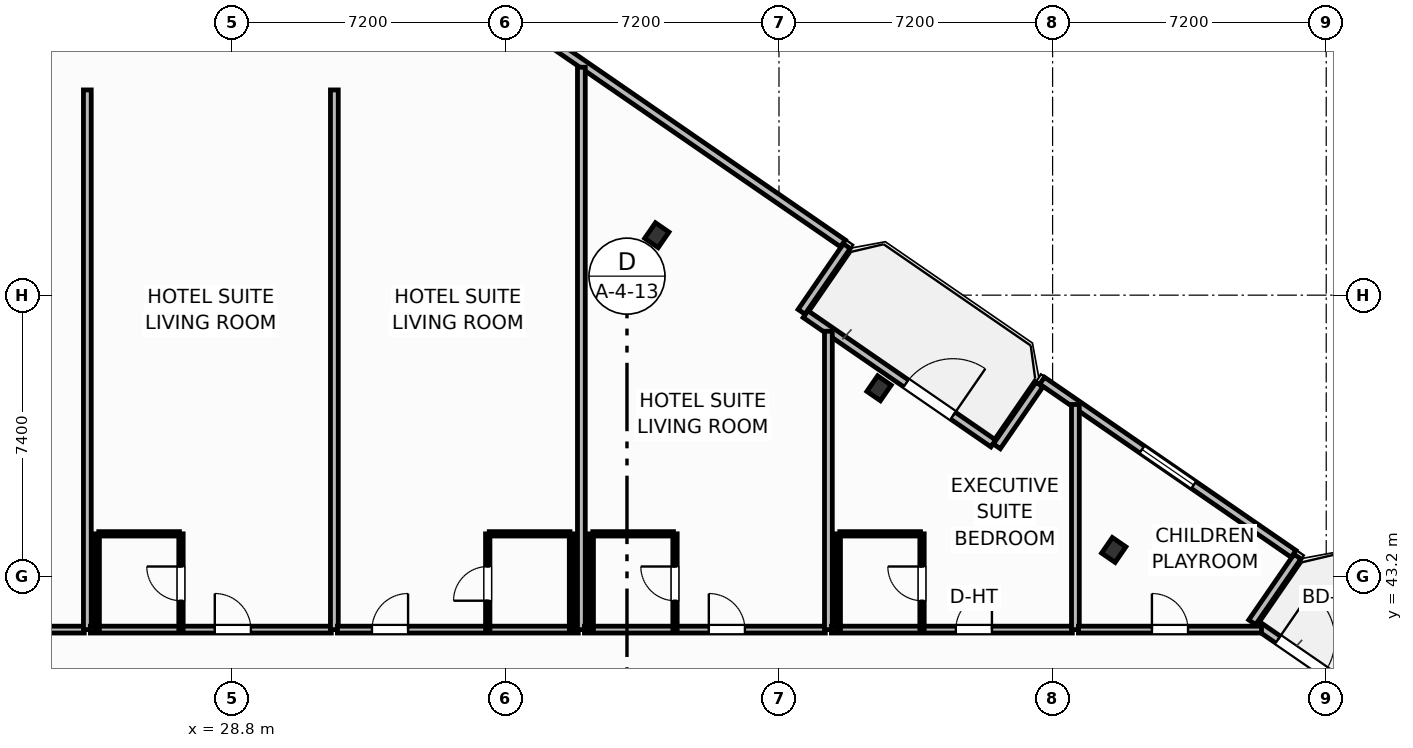
"""IFC4 building model, lengths in metres.
Left out: names, types, materials, properties, quantities, classifications, styles, units other than length and angle.
Written with IfcOpenShell. Run it as: python <this file> out.ifc"""

import sys

from ifc_helpers import new_model, si_unit, direction, frame, frame_2d, origin, origin_2d, place, context, subcontext, project, spatial, rectangle, i_section, extrude, element, fill, save


model = new_model("IFC4")
c1 = context("Model", 3, precision=1e-05, world=origin(), true_north=direction((0.0, 1.0)))
c2 = subcontext(c1, "Body", "Model", "MODEL_VIEW")
j1 = project(units=[si_unit("LENGTHUNIT", "METRE"), si_unit("PLANEANGLEUNIT", "RADIAN")], contexts=[c1])
p1 = place(None, origin())
s1 = spatial("IfcSite", under=j1, at=p1, CompositionType="ELEMENT")
p2 = place(p1, origin())
s2 = spatial("IfcBuilding", under=s1, at=p2, CompositionType="ELEMENT")
p3 = place(p2, frame((0.0, 0.0, 64.0)))
s3 = spatial("IfcBuildingStorey", under=s2, at=p3, CompositionType="ELEMENT", Elevation=64.0)
for number, where, z_axis, x_axis in (
    (1, (52.009, 43.896, 0.0), (0.0, 0.0, 1.0), (0.824, -0.567, 0.0)),
    (2, (45.833, 48.15, 0.0), (0.0, 0.0, 1.0), (0.824, -0.567, 0.0)),
    (3, (39.985, 52.177, 0.0), (0.0, 0.0, 1.0), (0.824, -0.567, 0.0)),
):
    element("IfcColumn", number, at=place(p3, frame(where, z_axis=z_axis, x_axis=x_axis)), inside=s3, PredefinedType="COLUMN", context=c2, shape_type="SweptSolid", body=[
        extrude(i_section(OverallWidth=0.432, OverallDepth=0.498, WebThickness=0.056, FlangeThickness=0.089, FilletRadius=0.025, at=origin_2d()), origin(), (0.0, 0.0, 1.0), 3.7),
    ])
p4 = place(p3, frame((43.898, 50.102, 0.0), z_axis=(0.0, 0.0, 1.0), x_axis=(0.823534636215, -0.567265989598, 0.0)))
e4 = element("IfcWall", 4, at=p4, inside=s3, PredefinedType="SOLIDWALL", context=c2, shape_type="SweptSolid", body=[
    extrude(rectangle(XDim=6.0, YDim=0.22, at=frame_2d((3.0, 0.0))), origin(), (0.0, 0.0, 1.0), 2.73),
])
p5 = place(p4, frame((3.212, 0.0, 0.0)))
e5 = element("IfcOpeningElement", 5, at=p5, cuts=e4, PredefinedType="OPENING", context=c2, shape_type="SweptSolid", body=[
    extrude(rectangle(XDim=1.5, YDim=2.25, at=frame_2d((0.75, 1.125))), frame((0.0, 0.12, 0.0), z_axis=(0.0, -1.0, 0.0), x_axis=(1.0, 0.0, 0.0)), (0.0, 0.0, 1.0), 0.24),
])
p6 = place(p3, frame((55.757, 41.933, 0.0), z_axis=(0.0, 0.0, 1.0), x_axis=(0.823534636215, -0.567265989598, 0.0)))
e6 = element("IfcWall", 6, at=p6, inside=s3, PredefinedType="SOLIDWALL", context=c2, shape_type="SweptSolid", body=[
    extrude(rectangle(XDim=6.0, YDim=0.22, at=frame_2d((3.0, 0.0))), origin(), (0.0, 0.0, 1.0), 2.73),
])
p7 = place(p6, frame((0.696, 0.0, 0.0)))
e7 = element("IfcOpeningElement", 7, at=p7, cuts=e6, PredefinedType="OPENING", context=c2, shape_type="SweptSolid", body=[
    extrude(rectangle(XDim=1.5, YDim=2.25, at=frame_2d((0.75, 1.125))), frame((0.0, 0.12, 0.0), z_axis=(0.0, -1.0, 0.0), x_axis=(1.0, 0.0, 0.0)), (0.0, 0.0, 1.0), 0.24),
])
p8 = place(p3, frame((55.653, 41.993, 0.0), z_axis=(0.0, 0.0, 1.0), x_axis=(0.567273696173, 0.823529327729, 0.0)))
e8 = element("IfcWall", 8, at=p8, inside=s3, PredefinedType="SOLIDWALL", context=c2, shape_type="SweptSolid", body=[
    extrude(rectangle(XDim=2.1, YDim=0.22, at=frame_2d((1.05, 0.0))), origin(), (0.0, 0.0, 1.0), 2.73),
])
p9 = place(p3, frame((56.741, 43.793, 0.0), z_axis=(0.0, 0.0, 1.0), x_axis=(-0.823530942962, 0.56727135128, 0.0)))
e9 = element("IfcWall", 9, at=p9, inside=s3, PredefinedType="SOLIDWALL", context=c2, shape_type="SweptSolid", body=[
    extrude(rectangle(XDim=8.035, YDim=0.22, at=frame_2d((4.018, 0.0))), origin(), (0.0, 0.0, 1.0), 2.73),
])
p10 = place(p9, frame((3.192, 0.0, 0.8)))
e10 = element("IfcOpeningElement", 10, at=p10, cuts=e9, PredefinedType="OPENING", context=c2, shape_type="SweptSolid", body=[
    extrude(rectangle(XDim=1.65, YDim=1.65, at=frame_2d((0.825, 0.825))), frame((0.0, 0.12, 0.0), z_axis=(0.0, -1.0, 0.0), x_axis=(1.0, 0.0, 0.0)), (0.0, 0.0, 1.0), 0.24),
])
p11 = place(p3, frame((50.053, 48.248, 0.0), z_axis=(0.0, 0.0, 1.0), x_axis=(-0.567273565974, -0.823529417415, 0.0)))
e11 = element("IfcWall", 11, at=p11, inside=s3, PredefinedType="SOLIDWALL", context=c2, shape_type="SweptSolid", body=[
    extrude(rectangle(XDim=1.975, YDim=0.22, at=frame_2d((0.988, 0.0))), origin(), (0.0, 0.0, 1.0), 2.73),
])
p12 = place(p3, frame((43.794, 50.161, 0.0), z_axis=(0.0, 0.0, 1.0), x_axis=(0.567352541689, 0.823475010816, 0.0)))
e12 = element("IfcWall", 12, at=p12, inside=s3, PredefinedType="SOLIDWALL", context=c2, shape_type="SweptSolid", body=[
    extrude(rectangle(XDim=2.1, YDim=0.22, at=frame_2d((1.05, 0.0))), origin(), (0.0, 0.0, 1.0), 2.73),
])
p13 = place(p3, frame((44.882, 51.962, 0.0), z_axis=(0.0, 0.0, 1.0), x_axis=(-0.823534427573, 0.567266292497, 0.0)))
e13 = element("IfcWall", 13, at=p13, inside=s3, PredefinedType="SOLIDWALL", context=c2, shape_type="SweptSolid", body=[
    extrude(rectangle(XDim=23.147, YDim=0.22, at=frame_2d((11.574, 0.0))), origin(), (0.0, 0.0, 1.0), 2.73),
])
p14 = place(p13, frame((10.749, 0.0, 0.8)))
e14 = element("IfcOpeningElement", 14, at=p14, cuts=e13, PredefinedType="OPENING", context=c2, shape_type="SweptSolid", body=[
    extrude(rectangle(XDim=1.65, YDim=1.65, at=frame_2d((0.825, 0.825))), frame((0.0, 0.12, 0.0), z_axis=(0.0, -1.0, 0.0), x_axis=(1.0, 0.0, 0.0)), (0.0, 0.0, 1.0), 0.24),
])
p15 = place(p3, frame((3.176, 41.8, 0.0), z_axis=(0.0, 0.0, 1.0), x_axis=(1.0, 0.0, 0.0)))
e15 = element("IfcWall", 15, at=p15, inside=s3, PredefinedType="PARTITIONING", context=c2, shape_type="SweptSolid", body=[
    extrude(rectangle(XDim=21.744, YDim=0.18, at=frame_2d((10.872, 0.0))), origin(), (0.0, 0.0, 1.0), 3.45),
])
p16 = place(p15, frame((18.101, 0.0, 0.0)))
e16 = element("IfcOpeningElement", 16, at=p16, cuts=e15, PredefinedType="OPENING", context=c2, shape_type="SweptSolid", body=[
    extrude(rectangle(XDim=0.95, YDim=2.15, at=frame_2d((0.475, 1.075))), frame((0.0, 0.1, 0.0), z_axis=(0.0, -1.0, 0.0), x_axis=(1.0, 0.0, 0.0)), (0.0, 0.0, 1.0), 0.2),
])
p17 = place(p3, frame((25.0, 41.8, 0.0), z_axis=(0.0, 0.0, 1.0), x_axis=(0.0, 1.0, 0.0)))
e17 = element("IfcWall", 17, at=p17, inside=s3, PredefinedType="PARTITIONING", context=c2, shape_type="SweptSolid", body=[
    extrude(rectangle(XDim=14.2, YDim=0.205, at=frame_2d((7.1, 0.0))), origin(), (0.0, 0.0, 1.0), 3.45),
])
p18 = place(p3, frame((25.08, 41.8, 0.0), z_axis=(0.0, 0.0, 1.0), x_axis=(1.0, 0.0, 0.0)))
e18 = element("IfcWall", 18, at=p18, inside=s3, PredefinedType="PARTITIONING", context=c2, shape_type="SweptSolid", body=[
    extrude(rectangle(XDim=6.34, YDim=0.18, at=frame_2d((3.17, 0.0))), origin(), (0.0, 0.0, 1.0), 3.45),
])
p19 = place(p18, frame((3.274, 0.0, 0.0)))
e19 = element("IfcOpeningElement", 19, at=p19, cuts=e18, PredefinedType="OPENING", context=c2, shape_type="SweptSolid", body=[
    extrude(rectangle(XDim=0.95, YDim=2.15, at=frame_2d((0.475, 1.075))), frame((0.0, 0.1, 0.0), z_axis=(0.0, -1.0, 0.0), x_axis=(1.0, 0.0, 0.0)), (0.0, 0.0, 1.0), 0.2),
])
p20 = place(p3, frame((25.3, 44.32, 0.0), z_axis=(0.0, 0.0, 1.0), x_axis=(1.0, 0.0, 0.0)))
e20 = element("IfcWall", 20, at=p20, inside=s3, PredefinedType="PARTITIONING", context=c2, shape_type="SweptSolid", body=[
    extrude(rectangle(XDim=2.124, YDim=0.115, at=frame_2d((1.062, 0.0))), origin(), (0.0, 0.0, 1.0), 3.45),
])
p21 = place(p3, frame((27.464, 41.8, 0.0), z_axis=(0.0, 0.0, 1.0), x_axis=(0.0, 1.0, 0.0)))
e21 = element("IfcWall", 21, at=p21, inside=s3, PredefinedType="PARTITIONING", context=c2, shape_type="SweptSolid", body=[
    extrude(rectangle(XDim=2.52, YDim=0.115, at=frame_2d((1.26, 0.0))), origin(), (0.0, 0.0, 1.0), 3.45),
])
p22 = place(p21, frame((0.76, 0.0, 0.0)))
e22 = element("IfcOpeningElement", 22, at=p22, cuts=e21, PredefinedType="OPENING", context=c2, shape_type="SweptSolid", body=[
    extrude(rectangle(XDim=0.9, YDim=2.05, at=frame_2d((0.45, 1.025))), frame((0.0, 0.067, 0.0), z_axis=(0.0, -1.0, 0.0), x_axis=(1.0, 0.0, 0.0)), (0.0, 0.0, 1.0), 0.135),
])
p23 = place(p3, frame((25.26, 41.8, 0.0), z_axis=(0.0, 0.0, 1.0), x_axis=(0.0, 1.0, 0.0)))
e23 = element("IfcWall", 23, at=p23, inside=s3, PredefinedType="PARTITIONING", context=c2, shape_type="SweptSolid", body=[
    extrude(rectangle(XDim=2.52, YDim=0.115, at=frame_2d((1.26, 0.0))), origin(), (0.0, 0.0, 1.0), 3.45),
])
p24 = place(p3, frame((31.5, 41.8, 0.0), z_axis=(0.0, 0.0, 1.0), x_axis=(0.0, 1.0, 0.0)))
e24 = element("IfcWall", 24, at=p24, inside=s3, PredefinedType="PARTITIONING", context=c2, shape_type="SweptSolid", body=[
    extrude(rectangle(XDim=14.2, YDim=0.205, at=frame_2d((7.1, 0.0))), origin(), (0.0, 0.0, 1.0), 3.45),
])
p25 = place(p3, frame((31.58, 41.8, 0.0), z_axis=(0.0, 0.0, 1.0), x_axis=(1.0, 0.0, 0.0)))
e25 = element("IfcWall", 25, at=p25, inside=s3, PredefinedType="PARTITIONING", context=c2, shape_type="SweptSolid", body=[
    extrude(rectangle(XDim=6.34, YDim=0.18, at=frame_2d((3.17, 0.0))), origin(), (0.0, 0.0, 1.0), 3.45),
])
p26 = place(p25, frame((0.91, 0.0, 0.0)))
e26 = element("IfcOpeningElement", 26, at=p26, cuts=e25, PredefinedType="OPENING", context=c2, shape_type="SweptSolid", body=[
    extrude(rectangle(XDim=0.95, YDim=2.15, at=frame_2d((0.475, 1.075))), frame((0.0, 0.1, 0.0), z_axis=(0.0, -1.0, 0.0), x_axis=(1.0, 0.0, 0.0)), (0.0, 0.0, 1.0), 0.2),
])
p27 = place(p3, frame((35.576, 44.32, 0.0), z_axis=(0.0, 0.0, 1.0), x_axis=(1.0, 0.0, 0.0)))
e27 = element("IfcWall", 27, at=p27, inside=s3, PredefinedType="PARTITIONING", context=c2, shape_type="SweptSolid", body=[
    extrude(rectangle(XDim=2.124, YDim=0.115, at=frame_2d((1.062, 0.0))), origin(), (0.0, 0.0, 1.0), 3.45),
])
p28 = place(p3, frame((35.536, 41.8, 0.0), z_axis=(0.0, 0.0, 1.0), x_axis=(0.0, 1.0, 0.0)))
e28 = element("IfcWall", 28, at=p28, inside=s3, PredefinedType="PARTITIONING", context=c2, shape_type="SweptSolid", body=[
    extrude(rectangle(XDim=2.52, YDim=0.115, at=frame_2d((1.26, 0.0))), origin(), (0.0, 0.0, 1.0), 3.45),
])
p29 = place(p28, frame((0.76, 0.0, 0.0)))
e29 = element("IfcOpeningElement", 29, at=p29, cuts=e28, PredefinedType="OPENING", context=c2, shape_type="SweptSolid", body=[
    extrude(rectangle(XDim=0.9, YDim=2.05, at=frame_2d((0.45, 1.025))), frame((0.0, 0.067, 0.0), z_axis=(0.0, -1.0, 0.0), x_axis=(1.0, 0.0, 0.0)), (0.0, 0.0, 1.0), 0.135),
])
p30 = place(p3, frame((37.74, 41.8, 0.0), z_axis=(0.0, 0.0, 1.0), x_axis=(0.0, 1.0, 0.0)))
e30 = element("IfcWall", 30, at=p30, inside=s3, PredefinedType="PARTITIONING", context=c2, shape_type="SweptSolid", body=[
    extrude(rectangle(XDim=2.52, YDim=0.115, at=frame_2d((1.26, 0.0))), origin(), (0.0, 0.0, 1.0), 3.45),
])
p31 = place(p3, frame((38.0, 41.8, 0.0), z_axis=(0.0, 0.0, 1.0), x_axis=(0.0, 1.0, 0.0)))
e31 = element("IfcWall", 31, at=p31, inside=s3, PredefinedType="PARTITIONING", context=c2, shape_type="SweptSolid", body=[
    extrude(rectangle(XDim=14.797, YDim=0.205, at=frame_2d((7.398, 0.0))), origin(), (0.0, 0.0, 1.0), 3.45),
])
p32 = place(p3, frame((38.08, 41.8, 0.0), z_axis=(0.0, 0.0, 1.0), x_axis=(1.0, 0.0, 0.0)))
e32 = element("IfcWall", 32, at=p32, inside=s3, PredefinedType="PARTITIONING", context=c2, shape_type="SweptSolid", body=[
    extrude(rectangle(XDim=6.34, YDim=0.18, at=frame_2d((3.17, 0.0))), origin(), (0.0, 0.0, 1.0), 3.45),
])
p33 = place(p32, frame((3.274, 0.0, 0.0)))
e33 = element("IfcOpeningElement", 33, at=p33, cuts=e32, PredefinedType="OPENING", context=c2, shape_type="SweptSolid", body=[
    extrude(rectangle(XDim=0.95, YDim=2.15, at=frame_2d((0.475, 1.075))), frame((0.0, 0.1, 0.0), z_axis=(0.0, -1.0, 0.0), x_axis=(1.0, 0.0, 0.0)), (0.0, 0.0, 1.0), 0.2),
])
p34 = place(p3, frame((38.3, 44.32, 0.0), z_axis=(0.0, 0.0, 1.0), x_axis=(1.0, 0.0, 0.0)))
e34 = element("IfcWall", 34, at=p34, inside=s3, PredefinedType="PARTITIONING", context=c2, shape_type="SweptSolid", body=[
    extrude(rectangle(XDim=2.124, YDim=0.115, at=frame_2d((1.062, 0.0))), origin(), (0.0, 0.0, 1.0), 3.45),
])
p35 = place(p3, frame((40.464, 41.8, 0.0), z_axis=(0.0, 0.0, 1.0), x_axis=(0.0, 1.0, 0.0)))
e35 = element("IfcWall", 35, at=p35, inside=s3, PredefinedType="PARTITIONING", context=c2, shape_type="SweptSolid", body=[
    extrude(rectangle(XDim=2.52, YDim=0.115, at=frame_2d((1.26, 0.0))), origin(), (0.0, 0.0, 1.0), 3.45),
])
p36 = place(p35, frame((0.76, 0.0, 0.0)))
e36 = element("IfcOpeningElement", 36, at=p36, cuts=e35, PredefinedType="OPENING", context=c2, shape_type="SweptSolid", body=[
    extrude(rectangle(XDim=0.9, YDim=2.05, at=frame_2d((0.45, 1.025))), frame((0.0, 0.067, 0.0), z_axis=(0.0, -1.0, 0.0), x_axis=(1.0, 0.0, 0.0)), (0.0, 0.0, 1.0), 0.135),
])
p37 = place(p3, frame((38.26, 41.8, 0.0), z_axis=(0.0, 0.0, 1.0), x_axis=(0.0, 1.0, 0.0)))
e37 = element("IfcWall", 37, at=p37, inside=s3, PredefinedType="PARTITIONING", context=c2, shape_type="SweptSolid", body=[
    extrude(rectangle(XDim=2.52, YDim=0.115, at=frame_2d((1.26, 0.0))), origin(), (0.0, 0.0, 1.0), 3.45),
])
p38 = place(p3, frame((44.5, 41.8, 0.0), z_axis=(0.0, 0.0, 1.0), x_axis=(0.0, 1.0, 0.0)))
e38 = element("IfcWall", 38, at=p38, inside=s3, PredefinedType="PARTITIONING", context=c2, shape_type="SweptSolid", body=[
    extrude(rectangle(XDim=7.851, YDim=0.205, at=frame_2d((3.925, 0.0))), origin(), (0.0, 0.0, 1.0), 3.45),
])
p39 = place(p3, frame((44.58, 41.8, 0.0), z_axis=(0.0, 0.0, 1.0), x_axis=(1.0, 0.0, 0.0)))
e39 = element("IfcWall", 39, at=p39, inside=s3, PredefinedType="PARTITIONING", context=c2, shape_type="SweptSolid", body=[
    extrude(rectangle(XDim=6.34, YDim=0.18, at=frame_2d((3.17, 0.0))), origin(), (0.0, 0.0, 1.0), 3.45),
])
p40 = place(p39, frame((3.274, 0.0, 0.0)))
e40 = element("IfcOpeningElement", 40, at=p40, cuts=e39, PredefinedType="OPENING", context=c2, shape_type="SweptSolid", body=[
    extrude(rectangle(XDim=0.95, YDim=2.15, at=frame_2d((0.475, 1.075))), frame((0.0, 0.1, 0.0), z_axis=(0.0, -1.0, 0.0), x_axis=(1.0, 0.0, 0.0)), (0.0, 0.0, 1.0), 0.2),
])
p41 = place(p3, frame((44.8, 44.32, 0.0), z_axis=(0.0, 0.0, 1.0), x_axis=(1.0, 0.0, 0.0)))
e41 = element("IfcWall", 41, at=p41, inside=s3, PredefinedType="PARTITIONING", context=c2, shape_type="SweptSolid", body=[
    extrude(rectangle(XDim=2.124, YDim=0.115, at=frame_2d((1.062, 0.0))), origin(), (0.0, 0.0, 1.0), 3.45),
])
p42 = place(p3, frame((46.964, 41.8, 0.0), z_axis=(0.0, 0.0, 1.0), x_axis=(0.0, 1.0, 0.0)))
e42 = element("IfcWall", 42, at=p42, inside=s3, PredefinedType="PARTITIONING", context=c2, shape_type="SweptSolid", body=[
    extrude(rectangle(XDim=2.52, YDim=0.115, at=frame_2d((1.26, 0.0))), origin(), (0.0, 0.0, 1.0), 2.58),
])
p43 = place(p42, frame((0.76, 0.0, 0.0)))
e43 = element("IfcOpeningElement", 43, at=p43, cuts=e42, PredefinedType="OPENING", context=c2, shape_type="SweptSolid", body=[
    extrude(rectangle(XDim=0.9, YDim=2.05, at=frame_2d((0.45, 1.025))), frame((0.0, 0.067, 0.0), z_axis=(0.0, -1.0, 0.0), x_axis=(1.0, 0.0, 0.0)), (0.0, 0.0, 1.0), 0.135),
])
p44 = place(p3, frame((44.76, 41.8, 0.0), z_axis=(0.0, 0.0, 1.0), x_axis=(0.0, 1.0, 0.0)))
e44 = element("IfcWall", 44, at=p44, inside=s3, PredefinedType="PARTITIONING", context=c2, shape_type="SweptSolid", body=[
    extrude(rectangle(XDim=2.52, YDim=0.115, at=frame_2d((1.26, 0.0))), origin(), (0.0, 0.0, 1.0), 3.45),
])
p45 = place(p3, frame((51.0, 41.8, 0.0), z_axis=(0.0, 0.0, 1.0), x_axis=(0.0, 1.0, 0.0)))
e45 = element("IfcWall", 45, at=p45, inside=s3, PredefinedType="PARTITIONING", context=c2, shape_type="SweptSolid", body=[
    extrude(rectangle(XDim=5.923, YDim=0.205, at=frame_2d((2.961, 0.0))), origin(), (0.0, 0.0, 1.0), 3.45),
])
p46 = place(p3, frame((51.08, 41.8, 0.0), z_axis=(0.0, 0.0, 1.0), x_axis=(1.0, 0.0, 0.0)))
e46 = element("IfcWall", 46, at=p46, inside=s3, PredefinedType="PARTITIONING", context=c2, shape_type="SweptSolid", body=[
    extrude(rectangle(XDim=4.817, YDim=0.18, at=frame_2d((2.408, 0.0))), origin(), (0.0, 0.0, 1.0), 3.45),
])
p47 = place(p46, frame((1.934, 0.0, 0.0)))
e47 = element("IfcOpeningElement", 47, at=p47, cuts=e46, PredefinedType="OPENING", context=c2, shape_type="SweptSolid", body=[
    extrude(rectangle(XDim=0.95, YDim=2.05, at=frame_2d((0.475, 1.025))), frame((0.0, 0.1, 0.0), z_axis=(0.0, -1.0, 0.0), x_axis=(1.0, 0.0, 0.0)), (0.0, 0.0, 1.0), 0.2),
])
p48 = place(p5, origin())
e48 = element("IfcDoor", 48, at=p48, inside=s3, OperationType="SINGLE_SWING_RIGHT", PredefinedType="DOOR", context=c2, shape_type="SweptSolid", body=[
    extrude(rectangle(XDim=1.5, YDim=2.25, at=frame_2d((0.75, 1.125))), frame((0.0, 0.025, 0.0), z_axis=(0.0, -1.0, 0.0), x_axis=(1.0, 0.0, 0.0)), (0.0, 0.0, 1.0), 0.05),
])
fill(e5, e48)
p49 = place(p7, origin())
e49 = element("IfcDoor", 49, at=p49, inside=s3, OperationType="SINGLE_SWING_LEFT", PredefinedType="DOOR", context=c2, shape_type="SweptSolid", body=[
    extrude(rectangle(XDim=1.5, YDim=2.25, at=frame_2d((0.75, 1.125))), frame((0.0, 0.025, 0.0), z_axis=(0.0, -1.0, 0.0), x_axis=(1.0, 0.0, 0.0)), (0.0, 0.0, 1.0), 0.05),
])
fill(e7, e49)
p50 = place(p10, origin())
e50 = element("IfcWindow", 50, at=p50, inside=s3, PartitioningType="SINGLE_PANEL", PredefinedType="WINDOW", context=c2, shape_type="SweptSolid", body=[
    extrude(rectangle(XDim=1.65, YDim=1.65, at=frame_2d((0.825, 0.825))), frame((0.0, 0.03, 0.0), z_axis=(0.0, -1.0, 0.0), x_axis=(1.0, 0.0, 0.0)), (0.0, 0.0, 1.0), 0.06),
])
fill(e10, e50)
p51 = place(p19, origin())
e51 = element("IfcDoor", 51, at=p51, inside=s3, OperationType="SINGLE_SWING_LEFT", PredefinedType="DOOR", context=c2, shape_type="SweptSolid", body=[
    extrude(rectangle(XDim=0.95, YDim=2.15, at=frame_2d((0.475, 1.075))), frame((0.0, 0.025, 0.0), z_axis=(0.0, -1.0, 0.0), x_axis=(1.0, 0.0, 0.0)), (0.0, 0.0, 1.0), 0.05),
])
fill(e19, e51)
p52 = place(p22, origin())
e52 = element("IfcDoor", 52, at=p52, inside=s3, OperationType="SINGLE_SWING_RIGHT", PredefinedType="DOOR", context=c2, shape_type="SweptSolid", body=[
    extrude(rectangle(XDim=0.9, YDim=2.05, at=frame_2d((0.45, 1.025))), frame((0.0, 0.025, 0.0), z_axis=(0.0, -1.0, 0.0), x_axis=(1.0, 0.0, 0.0)), (0.0, 0.0, 1.0), 0.05),
])
fill(e22, e52)
p53 = place(p26, origin())
e53 = element("IfcDoor", 53, at=p53, inside=s3, OperationType="SINGLE_SWING_RIGHT", PredefinedType="DOOR", context=c2, shape_type="SweptSolid", body=[
    extrude(rectangle(XDim=0.95, YDim=2.15, at=frame_2d((0.475, 1.075))), frame((0.0, 0.025, 0.0), z_axis=(0.0, -1.0, 0.0), x_axis=(1.0, 0.0, 0.0)), (0.0, 0.0, 1.0), 0.05),
])
fill(e26, e53)
p54 = place(p29, origin())
e54 = element("IfcDoor", 54, at=p54, inside=s3, OperationType="SINGLE_SWING_LEFT", PredefinedType="DOOR", context=c2, shape_type="SweptSolid", body=[
    extrude(rectangle(XDim=0.9, YDim=2.05, at=frame_2d((0.45, 1.025))), frame((0.0, 0.025, 0.0), z_axis=(0.0, -1.0, 0.0), x_axis=(1.0, 0.0, 0.0)), (0.0, 0.0, 1.0), 0.05),
])
fill(e29, e54)
p55 = place(p33, origin())
e55 = element("IfcDoor", 55, at=p55, inside=s3, OperationType="SINGLE_SWING_LEFT", PredefinedType="DOOR", context=c2, shape_type="SweptSolid", body=[
    extrude(rectangle(XDim=0.95, YDim=2.15, at=frame_2d((0.475, 1.075))), frame((0.0, 0.025, 0.0), z_axis=(0.0, -1.0, 0.0), x_axis=(1.0, 0.0, 0.0)), (0.0, 0.0, 1.0), 0.05),
])
fill(e33, e55)
p56 = place(p36, origin())
e56 = element("IfcDoor", 56, at=p56, inside=s3, OperationType="SINGLE_SWING_RIGHT", PredefinedType="DOOR", context=c2, shape_type="SweptSolid", body=[
    extrude(rectangle(XDim=0.9, YDim=2.05, at=frame_2d((0.45, 1.025))), frame((0.0, 0.025, 0.0), z_axis=(0.0, -1.0, 0.0), x_axis=(1.0, 0.0, 0.0)), (0.0, 0.0, 1.0), 0.05),
])
fill(e36, e56)
p57 = place(p40, origin())
e57 = element("IfcDoor", 57, at=p57, inside=s3, OperationType="SINGLE_SWING_RIGHT", PredefinedType="DOOR", context=c2, shape_type="SweptSolid", body=[
    extrude(rectangle(XDim=0.95, YDim=2.15, at=frame_2d((0.475, 1.075))), frame((0.0, 0.025, 0.0), z_axis=(0.0, -1.0, 0.0), x_axis=(1.0, 0.0, 0.0)), (0.0, 0.0, 1.0), 0.05),
])
fill(e40, e57)
p58 = place(p43, origin())
e58 = element("IfcDoor", 58, at=p58, inside=s3, OperationType="SINGLE_SWING_RIGHT", PredefinedType="DOOR", context=c2, shape_type="SweptSolid", body=[
    extrude(rectangle(XDim=0.9, YDim=2.05, at=frame_2d((0.45, 1.025))), frame((0.0, 0.025, 0.0), z_axis=(0.0, -1.0, 0.0), x_axis=(1.0, 0.0, 0.0)), (0.0, 0.0, 1.0), 0.05),
])
fill(e43, e58)
p59 = place(p47, origin())
e59 = element("IfcDoor", 59, at=p59, inside=s3, OperationType="SINGLE_SWING_LEFT", PredefinedType="DOOR", context=c2, shape_type="SweptSolid", body=[
    extrude(rectangle(XDim=0.95, YDim=2.05, at=frame_2d((0.475, 1.025))), frame((0.0, 0.025, 0.0), z_axis=(0.0, -1.0, 0.0), x_axis=(1.0, 0.0, 0.0)), (0.0, 0.0, 1.0), 0.05),
])
fill(e47, e59)
save(model, sys.argv[1])
